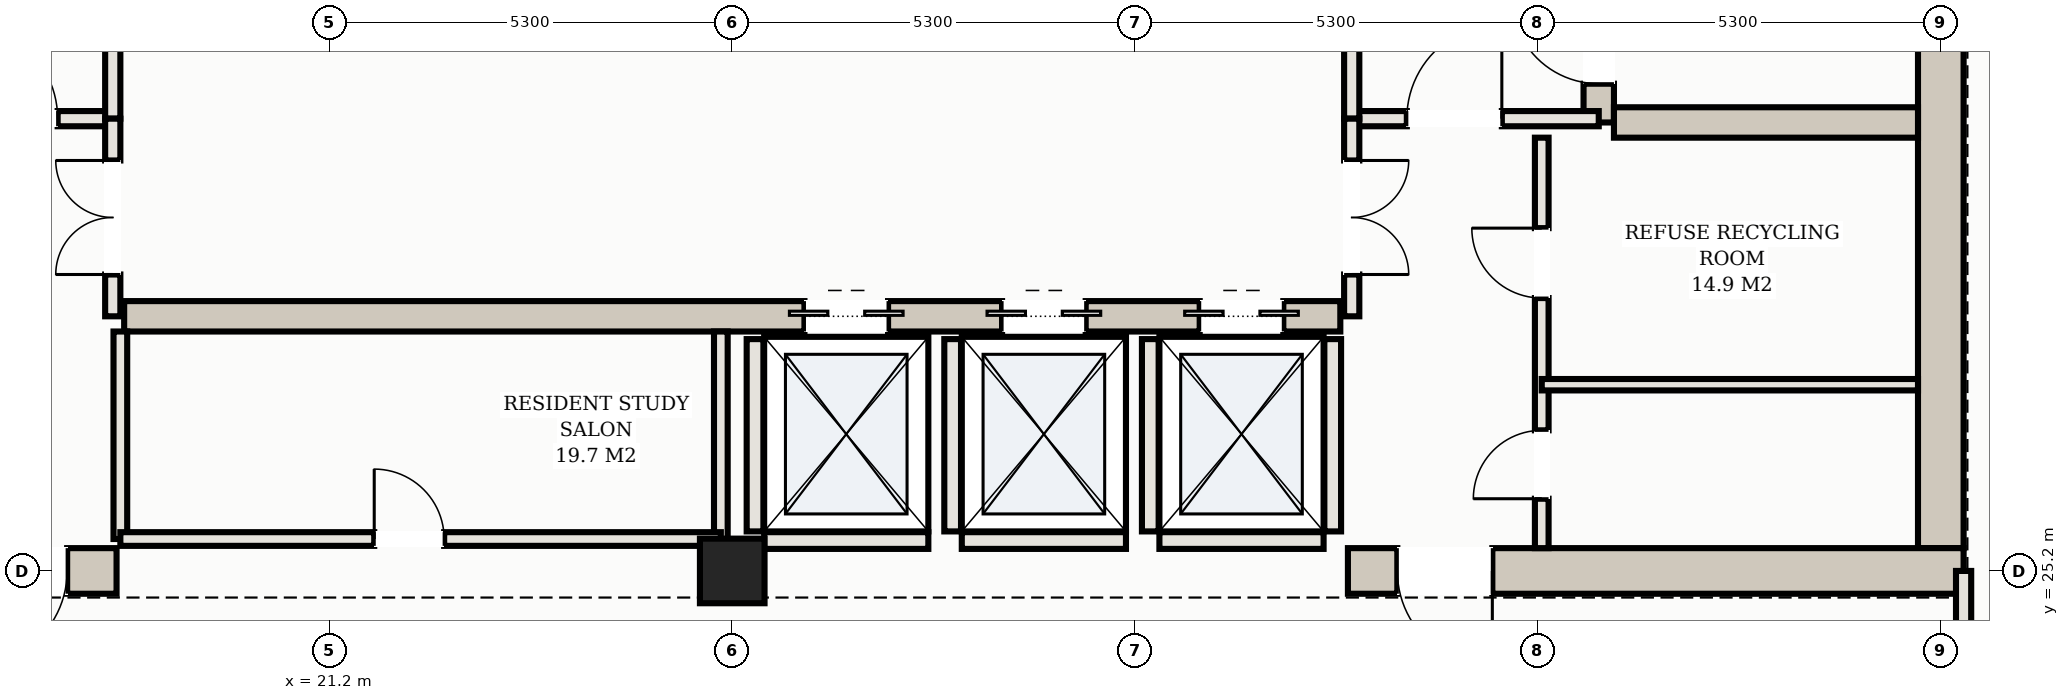
"""IFC4 building model, lengths in metres.
Left out: names, types, materials, properties, quantities, classifications, styles, units other than length and angle.
Written with IfcOpenShell. Run it as: python <this file> out.ifc"""

import sys

from ifc_helpers import new_model, si_unit, direction, frame, frame_2d, origin, origin_2d, place, context, subcontext, project, spatial, rectangle, hollow_rectangle, extrude, element, fill, save


model = new_model("IFC4")
c1 = context("Model", 3, precision=1e-05, world=origin(), true_north=direction((0.0, 1.0)))
c2 = subcontext(c1, "Body", "Model", "MODEL_VIEW")
j1 = project(units=[si_unit("LENGTHUNIT", "METRE"), si_unit("PLANEANGLEUNIT", "RADIAN")], contexts=[c1])
p1 = place(None, origin())
s1 = spatial("IfcSite", under=j1, at=p1, CompositionType="ELEMENT")
p2 = place(p1, origin())
s2 = spatial("IfcBuilding", under=s1, at=p2, CompositionType="ELEMENT")
p3 = place(p2, frame((0.0, 0.0, 178.8)))
s3 = spatial("IfcBuildingStorey", under=s2, at=p3, CompositionType="ELEMENT", Elevation=178.8)
p4 = place(p3, frame((42.4, 25.5, 0.0), z_axis=(0.0, 0.0, 1.0), x_axis=(0.0, 1.0, 0.0)))
e1 = element("IfcWall", 1, at=p4, inside=s3, PredefinedType="SHEAR", context=c2, shape_type="SweptSolid", body=[
    extrude(rectangle(XDim=14.2, YDim=0.6, at=frame_2d((7.1, 0.0))), origin(), (0.0, 0.0, 1.0), 3.1),
])
p5 = place(p3, frame((10.3, 25.2, 0.0), z_axis=(0.0, 0.0, 1.0), x_axis=(1.0, 0.0, 0.0)))
e2 = element("IfcWall", 2, at=p5, inside=s3, PredefinedType="SHEAR", context=c2, shape_type="SweptSolid", body=[
    extrude(rectangle(XDim=8.1, YDim=0.6, at=frame_2d((4.05, 0.0))), origin(), (0.0, 0.0, 1.0), 3.1),
])
p6 = place(p5, frame((6.2, 0.0, 0.0)))
e3 = element("IfcOpeningElement", 3, at=p6, cuts=e2, PredefinedType="OPENING", context=c2, shape_type="SweptSolid", body=[
    extrude(rectangle(XDim=1.25, YDim=2.2, at=frame_2d((0.625, 1.1))), frame((0.0, 0.31, 0.0), z_axis=(0.0, -1.0, 0.0), x_axis=(1.0, 0.0, 0.0)), (0.0, 0.0, 1.0), 0.62),
])
p7 = place(p3, frame((34.6, 25.2, 0.0), z_axis=(0.0, 0.0, 1.0), x_axis=(1.0, 0.0, 0.0)))
e4 = element("IfcWall", 4, at=p7, inside=s3, PredefinedType="SHEAR", context=c2, shape_type="SweptSolid", body=[
    extrude(rectangle(XDim=8.1, YDim=0.6, at=frame_2d((4.05, 0.0))), origin(), (0.0, 0.0, 1.0), 3.1),
])
p8 = place(p7, frame((0.65, 0.0, 0.0)))
e5 = element("IfcOpeningElement", 5, at=p8, cuts=e4, PredefinedType="OPENING", context=c2, shape_type="SweptSolid", body=[
    extrude(rectangle(XDim=1.25, YDim=2.2, at=frame_2d((0.625, 1.1))), frame((0.0, 0.31, 0.0), z_axis=(0.0, -1.0, 0.0), x_axis=(1.0, 0.0, 0.0)), (0.0, 0.0, 1.0), 0.62),
])
p9 = place(p3, frame((37.9, 31.1, 0.0), z_axis=(0.0, 0.0, 1.0), x_axis=(0.0, 1.0, 0.0)))
e6 = element("IfcWall", 6, at=p9, inside=s3, PredefinedType="SHEAR", context=c2, shape_type="SweptSolid", body=[
    extrude(rectangle(XDim=8.6, YDim=0.4, at=frame_2d((4.3, 0.0))), origin(), (0.0, 0.0, 1.0), 3.1),
])
p10 = place(p9, frame((0.51, 0.0, 0.0)))
e7 = element("IfcOpeningElement", 7, at=p10, cuts=e6, PredefinedType="OPENING", context=c2, shape_type="SweptSolid", body=[
    extrude(rectangle(XDim=1.15, YDim=2.2, at=frame_2d((0.575, 1.1))), frame((0.0, 0.21, 0.0), z_axis=(0.0, -1.0, 0.0), x_axis=(1.0, 0.0, 0.0)), (0.0, 0.0, 1.0), 0.42),
])
p11 = place(p3, frame((38.1, 31.1, 0.0), z_axis=(0.0, 0.0, 1.0), x_axis=(1.0, 0.0, 0.0)))
e8 = element("IfcWall", 8, at=p11, inside=s3, PredefinedType="SHEAR", context=c2, shape_type="SweptSolid", body=[
    extrude(rectangle(XDim=4.0, YDim=0.4, at=frame_2d((2.0, 0.0))), origin(), (0.0, 0.0, 1.0), 3.1),
])
p12 = place(p3, frame((18.5, 28.55, 0.0), z_axis=(0.0, 0.0, 1.0), x_axis=(1.0, 0.0, 0.0)))
e9 = element("IfcWall", 9, at=p12, inside=s3, PredefinedType="SHEAR", context=c2, shape_type="SweptSolid", body=[
    extrude(rectangle(XDim=16.0, YDim=0.4, at=frame_2d((8.0, 0.0))), origin(), (0.0, 0.0, 1.0), 3.1),
])
p13 = place(p12, frame((8.95, 0.0, 0.0)))
e10 = element("IfcOpeningElement", 10, at=p13, cuts=e9, PredefinedType="OPENING", context=c2, shape_type="SweptSolid", body=[
    extrude(rectangle(XDim=1.1, YDim=2.15, at=frame_2d((0.55, 1.075))), frame((0.0, 0.21, 0.0), z_axis=(0.0, -1.0, 0.0), x_axis=(1.0, 0.0, 0.0)), (0.0, 0.0, 1.0), 0.42),
])
p14 = place(p12, frame((11.55, 0.0, 0.0)))
e11 = element("IfcOpeningElement", 11, at=p14, cuts=e9, PredefinedType="OPENING", context=c2, shape_type="SweptSolid", body=[
    extrude(rectangle(XDim=1.1, YDim=2.15, at=frame_2d((0.55, 1.075))), frame((0.0, 0.21, 0.0), z_axis=(0.0, -1.0, 0.0), x_axis=(1.0, 0.0, 0.0)), (0.0, 0.0, 1.0), 0.42),
])
p15 = place(p12, frame((14.15, 0.0, 0.0)))
e12 = element("IfcOpeningElement", 12, at=p15, cuts=e9, PredefinedType="OPENING", context=c2, shape_type="SweptSolid", body=[
    extrude(rectangle(XDim=1.1, YDim=2.15, at=frame_2d((0.55, 1.075))), frame((0.0, 0.21, 0.0), z_axis=(0.0, -1.0, 0.0), x_axis=(1.0, 0.0, 0.0)), (0.0, 0.0, 1.0), 0.42),
])
p16 = place(p3, frame((26.5, 25.2, 0.0), z_axis=(0.0, 0.0, 1.0), x_axis=(1.0, 0.0, 0.0)))
e13 = element("IfcColumn", 13, at=p16, inside=s3, PredefinedType="COLUMN", context=c2, shape_type="SweptSolid", body=[
    extrude(hollow_rectangle(XDim=0.85, YDim=0.85, WallThickness=0.028, at=origin_2d()), origin(), (0.0, 0.0, 1.0), 3.3),
])
p17 = place(p3, frame((26.8, 25.72, 0.0), z_axis=(0.0, 0.0, 1.0), x_axis=(0.0, 1.0, 0.0)))
e14 = element("IfcWall", 14, at=p17, inside=s3, PredefinedType="SOLIDWALL", context=c2, shape_type="SweptSolid", body=[
    extrude(rectangle(XDim=2.53, YDim=0.22, at=frame_2d((1.265, 0.0))), origin(), (0.0, 0.0, 1.0), 3.1),
])
p18 = place(p3, frame((26.92, 25.6, 0.0), z_axis=(0.0, 0.0, 1.0), x_axis=(1.0, 0.0, 0.0)))
e15 = element("IfcWall", 15, at=p18, inside=s3, PredefinedType="SOLIDWALL", context=c2, shape_type="SweptSolid", body=[
    extrude(rectangle(XDim=2.16, YDim=0.22, at=frame_2d((1.08, 0.0))), origin(), (0.0, 0.0, 1.0), 2.295),
])
p19 = place(p3, frame((29.4, 25.72, 0.0), z_axis=(0.0, 0.0, 1.0), x_axis=(0.0, 1.0, 0.0)))
e16 = element("IfcWall", 16, at=p19, inside=s3, PredefinedType="SOLIDWALL", context=c2, shape_type="SweptSolid", body=[
    extrude(rectangle(XDim=2.53, YDim=0.22, at=frame_2d((1.265, 0.0))), origin(), (0.0, 0.0, 1.0), 3.1),
])
p20 = place(p3, frame((29.52, 25.6, 0.0), z_axis=(0.0, 0.0, 1.0), x_axis=(1.0, 0.0, 0.0)))
e17 = element("IfcWall", 17, at=p20, inside=s3, PredefinedType="SOLIDWALL", context=c2, shape_type="SweptSolid", body=[
    extrude(rectangle(XDim=2.16, YDim=0.22, at=frame_2d((1.08, 0.0))), origin(), (0.0, 0.0, 1.0), 2.295),
])
for number, where, z_axis, x_axis in (
    (18, (32.0, 25.72, 0.0), (0.0, 0.0, 1.0), (0.0, 1.0, 0.0)),
    (19, (34.4, 25.72, 0.0), (0.0, 0.0, 1.0), (0.0, 1.0, 0.0)),
):
    element("IfcWall", number, at=place(p3, frame(where, z_axis=z_axis, x_axis=x_axis)), inside=s3, PredefinedType="SOLIDWALL", context=c2, shape_type="SweptSolid", body=[
        extrude(rectangle(XDim=2.53, YDim=0.22, at=frame_2d((1.265, 0.0))), origin(), (0.0, 0.0, 1.0), 3.1),
    ])
p21 = place(p3, frame((32.12, 25.6, 0.0), z_axis=(0.0, 0.0, 1.0), x_axis=(1.0, 0.0, 0.0)))
e20 = element("IfcWall", 20, at=p21, inside=s3, PredefinedType="SOLIDWALL", context=c2, shape_type="SweptSolid", body=[
    extrude(rectangle(XDim=2.16, YDim=0.22, at=frame_2d((1.08, 0.0))), origin(), (0.0, 0.0, 1.0), 2.295),
])
p22 = place(p3, frame((15.1, 31.15, 0.0), z_axis=(0.0, 0.0, 1.0), x_axis=(1.0, 0.0, 0.0)))
e21 = element("IfcWall", 21, at=p22, inside=s3, PredefinedType="PARTITIONING", context=c2, shape_type="SweptSolid", body=[
    extrude(rectangle(XDim=3.25, YDim=0.2, at=frame_2d((1.625, 0.0))), origin(), (0.0, 0.0, 1.0), 2.38),
])
p23 = place(p22, frame((1.275, 0.0, 0.0)))
e22 = element("IfcOpeningElement", 22, at=p23, cuts=e21, PredefinedType="OPENING", context=c2, shape_type="SweptSolid", body=[
    extrude(rectangle(XDim=1.25, YDim=2.2, at=frame_2d((0.625, 1.1))), frame((0.0, 0.11, 0.0), z_axis=(0.0, -1.0, 0.0), x_axis=(1.0, 0.0, 0.0)), (0.0, 0.0, 1.0), 0.22),
])
p24 = place(p3, frame((18.35, 31.15, 0.0), z_axis=(0.0, 0.0, 1.0), x_axis=(0.0, 1.0, 0.0)))
e23 = element("IfcWall", 23, at=p24, inside=s3, PredefinedType="PARTITIONING", context=c2, shape_type="SweptSolid", body=[
    extrude(rectangle(XDim=5.15, YDim=0.2, at=frame_2d((2.575, 0.0))), origin(), (0.0, 0.0, 1.0), 2.38),
])
p25 = place(p24, frame((1.875, 0.0, 0.0)))
e24 = element("IfcOpeningElement", 24, at=p25, cuts=e23, PredefinedType="OPENING", context=c2, shape_type="SweptSolid", body=[
    extrude(rectangle(XDim=1.25, YDim=2.2, at=frame_2d((0.625, 1.1))), frame((0.0, 0.11, 0.0), z_axis=(0.0, -1.0, 0.0), x_axis=(1.0, 0.0, 0.0)), (0.0, 0.0, 1.0), 0.22),
])
p26 = place(p3, frame((34.65, 31.15, 0.0), z_axis=(0.0, 0.0, 1.0), x_axis=(1.0, 0.0, 0.0)))
e25 = element("IfcWall", 25, at=p26, inside=s3, PredefinedType="PARTITIONING", context=c2, shape_type="SweptSolid", body=[
    extrude(rectangle(XDim=3.25, YDim=0.2, at=frame_2d((1.625, 0.0))), origin(), (0.0, 0.0, 1.0), 2.38),
])
p27 = place(p26, frame((0.725, 0.0, 0.0)))
e26 = element("IfcOpeningElement", 26, at=p27, cuts=e25, PredefinedType="OPENING", context=c2, shape_type="SweptSolid", body=[
    extrude(rectangle(XDim=1.25, YDim=2.2, at=frame_2d((0.625, 1.1))), frame((0.0, 0.11, 0.0), z_axis=(0.0, -1.0, 0.0), x_axis=(1.0, 0.0, 0.0)), (0.0, 0.0, 1.0), 0.22),
])
p28 = place(p3, frame((34.65, 31.15, 0.0), z_axis=(0.0, 0.0, 1.0), x_axis=(0.0, 1.0, 0.0)))
e27 = element("IfcWall", 27, at=p28, inside=s3, PredefinedType="PARTITIONING", context=c2, shape_type="SweptSolid", body=[
    extrude(rectangle(XDim=5.15, YDim=0.2, at=frame_2d((2.575, 0.0))), origin(), (0.0, 0.0, 1.0), 2.38),
])
p29 = place(p28, frame((1.875, 0.0, 0.0)))
e28 = element("IfcOpeningElement", 28, at=p29, cuts=e27, PredefinedType="OPENING", context=c2, shape_type="SweptSolid", body=[
    extrude(rectangle(XDim=1.25, YDim=2.2, at=frame_2d((0.625, 1.1))), frame((0.0, 0.11, 0.0), z_axis=(0.0, -1.0, 0.0), x_axis=(1.0, 0.0, 0.0)), (0.0, 0.0, 1.0), 0.22),
])
p30 = place(p3, frame((37.15, 25.5, 0.0), z_axis=(0.0, 0.0, 1.0), x_axis=(0.0, 1.0, 0.0)))
e29 = element("IfcWall", 29, at=p30, inside=s3, PredefinedType="PARTITIONING", context=c2, shape_type="SweptSolid", body=[
    extrude(rectangle(XDim=5.4, YDim=0.18, at=frame_2d((2.7, 0.0))), origin(), (0.0, 0.0, 1.0), 2.38),
])
p31 = place(p30, frame((0.65, 0.0, 0.0)))
e30 = element("IfcOpeningElement", 30, at=p31, cuts=e29, PredefinedType="OPENING", context=c2, shape_type="SweptSolid", body=[
    extrude(rectangle(XDim=0.9, YDim=2.15, at=frame_2d((0.45, 1.075))), frame((0.0, 0.1, 0.0), z_axis=(0.0, -1.0, 0.0), x_axis=(1.0, 0.0, 0.0)), (0.0, 0.0, 1.0), 0.2),
])
p32 = place(p30, frame((3.29, 0.0, 0.0)))
e31 = element("IfcOpeningElement", 31, at=p32, cuts=e29, PredefinedType="OPENING", context=c2, shape_type="SweptSolid", body=[
    extrude(rectangle(XDim=0.92, YDim=2.15, at=frame_2d((0.46, 1.075))), frame((0.0, 0.1, 0.0), z_axis=(0.0, -1.0, 0.0), x_axis=(1.0, 0.0, 0.0)), (0.0, 0.0, 1.0), 0.2),
])
p33 = place(p3, frame((37.15, 27.65, 0.0), z_axis=(0.0, 0.0, 1.0), x_axis=(1.0, 0.0, 0.0)))
e32 = element("IfcWall", 32, at=p33, inside=s3, PredefinedType="PARTITIONING", context=c2, shape_type="SweptSolid", body=[
    extrude(rectangle(XDim=4.95, YDim=0.15, at=frame_2d((2.475, 0.0))), origin(), (0.0, 0.0, 1.0), 2.38),
])
p34 = place(p3, frame((18.35, 28.55, 0.0), z_axis=(0.0, 0.0, 1.0), x_axis=(0.0, 1.0, 0.0)))
e33 = element("IfcWall", 33, at=p34, inside=s3, PredefinedType="PARTITIONING", context=c2, shape_type="SweptSolid", body=[
    extrude(rectangle(XDim=2.6, YDim=0.2, at=frame_2d((1.3, 0.0))), origin(), (0.0, 0.0, 1.0), 2.38),
])
p35 = place(p34, frame((0.55, 0.0, 0.0)))
e34 = element("IfcOpeningElement", 34, at=p35, cuts=e33, PredefinedType="OPENING", context=c2, shape_type="SweptSolid", body=[
    extrude(rectangle(XDim=1.5, YDim=2.25, at=frame_2d((0.75, 1.125))), frame((0.0, 0.11, 0.0), z_axis=(0.0, -1.0, 0.0), x_axis=(1.0, 0.0, 0.0)), (0.0, 0.0, 1.0), 0.22),
])
p36 = place(p3, frame((34.65, 28.55, 0.0), z_axis=(0.0, 0.0, 1.0), x_axis=(0.0, 1.0, 0.0)))
e35 = element("IfcWall", 35, at=p36, inside=s3, PredefinedType="PARTITIONING", context=c2, shape_type="SweptSolid", body=[
    extrude(rectangle(XDim=2.6, YDim=0.2, at=frame_2d((1.3, 0.0))), origin(), (0.0, 0.0, 1.0), 2.38),
])
p37 = place(p36, frame((0.55, 0.0, 0.0)))
e36 = element("IfcOpeningElement", 36, at=p37, cuts=e35, PredefinedType="OPENING", context=c2, shape_type="SweptSolid", body=[
    extrude(rectangle(XDim=1.5, YDim=2.25, at=frame_2d((0.75, 1.125))), frame((0.0, 0.11, 0.0), z_axis=(0.0, -1.0, 0.0), x_axis=(1.0, 0.0, 0.0)), (0.0, 0.0, 1.0), 0.22),
])
for number, where, z_axis, x_axis in (
    (37, (18.45, 25.62, 0.0), (0.0, 0.0, 1.0), (0.0, 1.0, 0.0)),
    (38, (26.35, 25.62, 0.0), (0.0, 0.0, 1.0), (0.0, 1.0, 0.0)),
):
    element("IfcWall", number, at=place(p3, frame(where, z_axis=z_axis, x_axis=x_axis)), inside=s3, PredefinedType="PARTITIONING", context=c2, shape_type="SweptSolid", body=[
        extrude(rectangle(XDim=2.73, YDim=0.18, at=frame_2d((1.365, 0.0))), origin(), (0.0, 0.0, 1.0), 2.38),
    ])
p38 = place(p3, frame((18.45, 25.62, 0.0), z_axis=(0.0, 0.0, 1.0), x_axis=(1.0, 0.0, 0.0)))
e39 = element("IfcWall", 39, at=p38, inside=s3, PredefinedType="PARTITIONING", context=c2, shape_type="SweptSolid", body=[
    extrude(rectangle(XDim=7.9, YDim=0.18, at=frame_2d((3.95, 0.0))), origin(), (0.0, 0.0, 1.0), 2.38),
])
p39 = place(p38, frame((3.34, 0.0, 0.0)))
e40 = element("IfcOpeningElement", 40, at=p39, cuts=e39, PredefinedType="OPENING", context=c2, shape_type="SweptSolid", body=[
    extrude(rectangle(XDim=0.92, YDim=2.15, at=frame_2d((0.46, 1.075))), frame((0.0, 0.1, 0.0), z_axis=(0.0, -1.0, 0.0), x_axis=(1.0, 0.0, 0.0)), (0.0, 0.0, 1.0), 0.2),
])
p40 = place(p3, frame((42.7, 22.9, 0.0), z_axis=(0.0, 0.0, 1.0), x_axis=(0.0, 1.0, 0.0)))
e41 = element("IfcWall", 41, at=p40, inside=s3, PredefinedType="PARTITIONING", context=c2, shape_type="SweptSolid", body=[
    extrude(rectangle(XDim=2.3, YDim=0.2, at=frame_2d((1.15, 0.0))), origin(), (0.0, 0.0, 1.0), 2.38),
])
p41 = place(p13, origin())
e42 = element("IfcDoor", 42, at=p41, inside=s3, OperationType="DOUBLE_DOOR_SLIDING", PredefinedType="DOOR", context=c2, shape_type="SweptSolid", body=[
    extrude(rectangle(XDim=1.1, YDim=2.15, at=frame_2d((0.55, 1.075))), frame((0.0, 0.025, 0.0), z_axis=(0.0, -1.0, 0.0), x_axis=(1.0, 0.0, 0.0)), (0.0, 0.0, 1.0), 0.05),
])
fill(e10, e42)
p42 = place(p14, origin())
e43 = element("IfcDoor", 43, at=p42, inside=s3, OperationType="DOUBLE_DOOR_SLIDING", PredefinedType="DOOR", context=c2, shape_type="SweptSolid", body=[
    extrude(rectangle(XDim=1.1, YDim=2.15, at=frame_2d((0.55, 1.075))), frame((0.0, 0.025, 0.0), z_axis=(0.0, -1.0, 0.0), x_axis=(1.0, 0.0, 0.0)), (0.0, 0.0, 1.0), 0.05),
])
fill(e11, e43)
p43 = place(p15, origin())
e44 = element("IfcDoor", 44, at=p43, inside=s3, OperationType="DOUBLE_DOOR_SLIDING", PredefinedType="DOOR", context=c2, shape_type="SweptSolid", body=[
    extrude(rectangle(XDim=1.1, YDim=2.15, at=frame_2d((0.55, 1.075))), frame((0.0, 0.025, 0.0), z_axis=(0.0, -1.0, 0.0), x_axis=(1.0, 0.0, 0.0)), (0.0, 0.0, 1.0), 0.05),
])
fill(e12, e44)
p44 = place(p6, frame((1.25, 0.0, 0.0), z_axis=(0.0, 0.0, 1.0), x_axis=(-1.0, 0.0, 0.0)))
e45 = element("IfcDoor", 45, at=p44, inside=s3, OperationType="SINGLE_SWING_RIGHT", PredefinedType="DOOR", context=c2, shape_type="SweptSolid", body=[
    extrude(rectangle(XDim=1.25, YDim=2.2, at=frame_2d((0.625, 1.1))), frame((0.0, 0.025, 0.0), z_axis=(0.0, -1.0, 0.0), x_axis=(1.0, 0.0, 0.0)), (0.0, 0.0, 1.0), 0.05),
])
fill(e3, e45)
p45 = place(p8, frame((1.25, 0.0, 0.0), z_axis=(0.0, 0.0, 1.0), x_axis=(-1.0, 0.0, 0.0)))
e46 = element("IfcDoor", 46, at=p45, inside=s3, OperationType="SINGLE_SWING_LEFT", PredefinedType="DOOR", context=c2, shape_type="SweptSolid", body=[
    extrude(rectangle(XDim=1.25, YDim=2.2, at=frame_2d((0.625, 1.1))), frame((0.0, 0.025, 0.0), z_axis=(0.0, -1.0, 0.0), x_axis=(1.0, 0.0, 0.0)), (0.0, 0.0, 1.0), 0.05),
])
fill(e5, e46)
p46 = place(p23, origin())
e47 = element("IfcDoor", 47, at=p46, inside=s3, OperationType="SINGLE_SWING_LEFT", PredefinedType="DOOR", context=c2, shape_type="SweptSolid", body=[
    extrude(rectangle(XDim=1.25, YDim=2.2, at=frame_2d((0.625, 1.1))), frame((0.0, 0.025, 0.0), z_axis=(0.0, -1.0, 0.0), x_axis=(1.0, 0.0, 0.0)), (0.0, 0.0, 1.0), 0.05),
])
fill(e22, e47)
p47 = place(p27, origin())
e48 = element("IfcDoor", 48, at=p47, inside=s3, OperationType="SINGLE_SWING_RIGHT", PredefinedType="DOOR", context=c2, shape_type="SweptSolid", body=[
    extrude(rectangle(XDim=1.25, YDim=2.2, at=frame_2d((0.625, 1.1))), frame((0.0, 0.025, 0.0), z_axis=(0.0, -1.0, 0.0), x_axis=(1.0, 0.0, 0.0)), (0.0, 0.0, 1.0), 0.05),
])
fill(e26, e48)
p48 = place(p10, origin())
e49 = element("IfcDoor", 49, at=p48, inside=s3, OperationType="SINGLE_SWING_RIGHT", PredefinedType="DOOR", context=c2, shape_type="SweptSolid", body=[
    extrude(rectangle(XDim=1.15, YDim=2.2, at=frame_2d((0.575, 1.1))), frame((0.0, 0.025, 0.0), z_axis=(0.0, -1.0, 0.0), x_axis=(1.0, 0.0, 0.0)), (0.0, 0.0, 1.0), 0.05),
])
fill(e7, e49)
p49 = place(p31, origin())
e50 = element("IfcDoor", 50, at=p49, inside=s3, OperationType="SINGLE_SWING_LEFT", PredefinedType="DOOR", context=c2, shape_type="SweptSolid", body=[
    extrude(rectangle(XDim=0.9, YDim=2.15, at=frame_2d((0.45, 1.075))), frame((0.0, 0.025, 0.0), z_axis=(0.0, -1.0, 0.0), x_axis=(1.0, 0.0, 0.0)), (0.0, 0.0, 1.0), 0.05),
])
fill(e30, e50)
p50 = place(p32, origin())
e51 = element("IfcDoor", 51, at=p50, inside=s3, OperationType="SINGLE_SWING_RIGHT", PredefinedType="DOOR", context=c2, shape_type="SweptSolid", body=[
    extrude(rectangle(XDim=0.92, YDim=2.15, at=frame_2d((0.46, 1.075))), frame((0.0, 0.025, 0.0), z_axis=(0.0, -1.0, 0.0), x_axis=(1.0, 0.0, 0.0)), (0.0, 0.0, 1.0), 0.05),
])
fill(e31, e51)
p51 = place(p35, origin())
e52 = element("IfcDoor", 52, at=p51, inside=s3, OperationType="DOUBLE_DOOR_SINGLE_SWING", PredefinedType="DOOR", context=c2, shape_type="SweptSolid", body=[
    extrude(rectangle(XDim=1.5, YDim=2.25, at=frame_2d((0.75, 1.125))), frame((0.0, 0.025, 0.0), z_axis=(0.0, -1.0, 0.0), x_axis=(1.0, 0.0, 0.0)), (0.0, 0.0, 1.0), 0.05),
])
fill(e34, e52)
p52 = place(p37, frame((1.5, 0.0, 0.0), z_axis=(0.0, 0.0, 1.0), x_axis=(-1.0, 0.0, 0.0)))
e53 = element("IfcDoor", 53, at=p52, inside=s3, OperationType="DOUBLE_DOOR_SINGLE_SWING", PredefinedType="DOOR", context=c2, shape_type="SweptSolid", body=[
    extrude(rectangle(XDim=1.5, YDim=2.25, at=frame_2d((0.75, 1.125))), frame((0.0, 0.025, 0.0), z_axis=(0.0, -1.0, 0.0), x_axis=(1.0, 0.0, 0.0)), (0.0, 0.0, 1.0), 0.05),
])
fill(e36, e53)
p53 = place(p39, origin())
e54 = element("IfcDoor", 54, at=p53, inside=s3, OperationType="SINGLE_SWING_LEFT", PredefinedType="DOOR", context=c2, shape_type="SweptSolid", body=[
    extrude(rectangle(XDim=0.92, YDim=2.15, at=frame_2d((0.46, 1.075))), frame((0.0, 0.025, 0.0), z_axis=(0.0, -1.0, 0.0), x_axis=(1.0, 0.0, 0.0)), (0.0, 0.0, 1.0), 0.05),
])
fill(e40, e54)
save(model, sys.argv[1])
